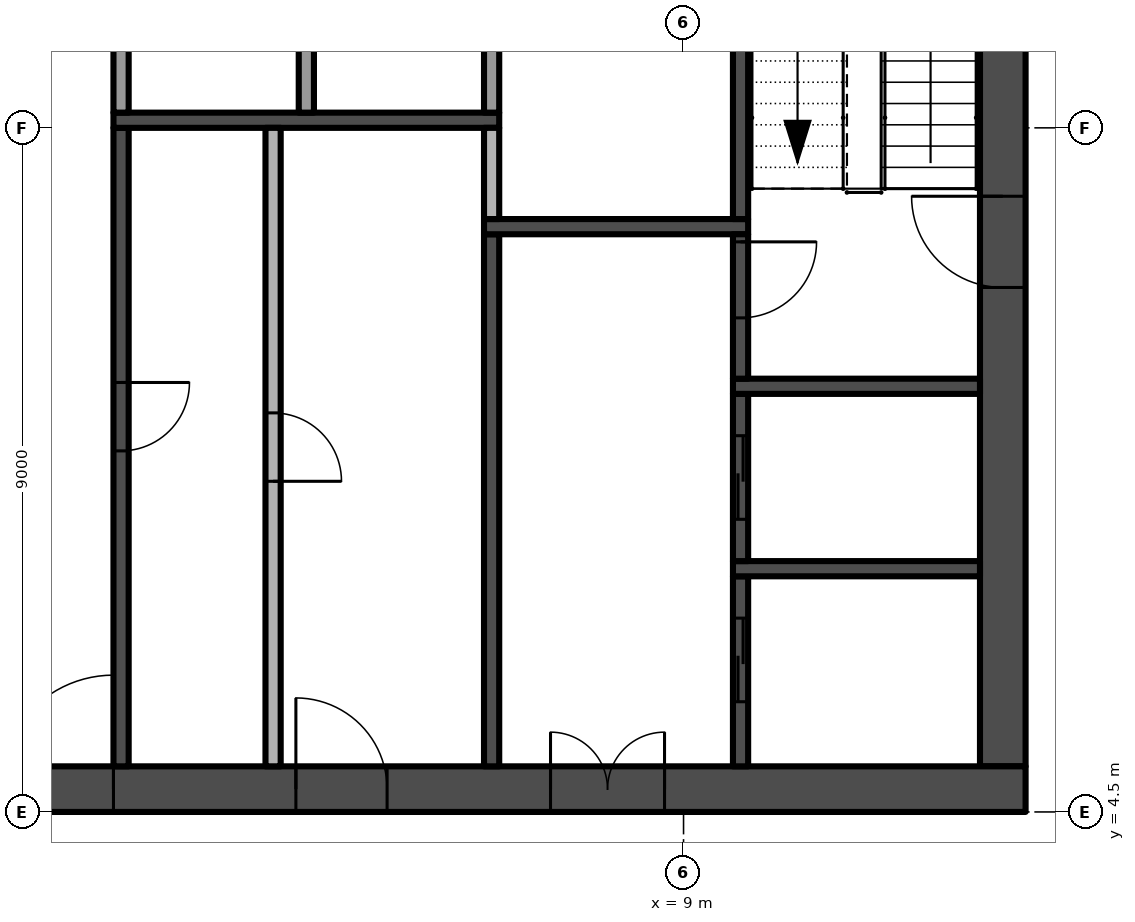
"""IFC4 building model, lengths in metres.
Left out: names, types, materials, properties, quantities, classifications, styles, units other than length and angle.
Written with IfcOpenShell. Run it as: python <this file> out.ifc"""

import sys

from ifc_helpers import new_model, si_unit, direction, frame, frame_2d, origin, place, context, subcontext, project, spatial, rectangle, extrude, element, fill, save


model = new_model("IFC4")
c1 = context("Model", 3, precision=1e-05, world=origin(), true_north=direction((0.0, 1.0)))
c2 = subcontext(c1, "Body", "Model", "MODEL_VIEW")
j1 = project(units=[si_unit("LENGTHUNIT", "METRE"), si_unit("PLANEANGLEUNIT", "RADIAN")], contexts=[c1])
p1 = place(None, origin())
s1 = spatial("IfcSite", under=j1, at=p1, CompositionType="ELEMENT")
p2 = place(p1, origin())
s2 = spatial("IfcBuilding", under=s1, at=p2, CompositionType="ELEMENT")
p3 = place(p2, frame((0.0, 0.0, 207.2)))
s3 = spatial("IfcBuildingStorey", under=s2, at=p3, CompositionType="ELEMENT", Elevation=207.2)
p4 = place(p3, frame((-13.5, 4.8, -0.3), z_axis=(0.0, 0.0, 1.0), x_axis=(1.0, 0.0, 0.0)))
e1 = element("IfcWall", 1, at=p4, inside=s3, PredefinedType="SHEAR", context=c2, shape_type="SweptSolid", body=[
    extrude(rectangle(XDim=27.0, YDim=0.6, at=frame_2d((13.5, 0.0))), origin(), (0.0, 0.0, 1.0), 3.8),
])
p5 = place(p4, frame((12.0, 0.0, 0.3)))
e2 = element("IfcOpeningElement", 2, at=p5, cuts=e1, PredefinedType="OPENING", context=c2, shape_type="SweptSolid", body=[
    extrude(rectangle(XDim=3.0, YDim=2.4, at=frame_2d((1.5, 1.2))), frame((0.0, 0.31, 0.0), z_axis=(0.0, -1.0, 0.0), x_axis=(1.0, 0.0, 0.0)), (0.0, 0.0, 1.0), 0.62),
])
p6 = place(p4, frame((4.9, 0.0, 0.3)))
e3 = element("IfcOpeningElement", 3, at=p6, cuts=e1, PredefinedType="OPENING", context=c2, shape_type="SweptSolid", body=[
    extrude(rectangle(XDim=1.2, YDim=2.2, at=frame_2d((0.6, 1.1))), frame((0.0, 0.31, 0.0), z_axis=(0.0, -1.0, 0.0), x_axis=(1.0, 0.0, 0.0)), (0.0, 0.0, 1.0), 0.62),
])
p7 = place(p4, frame((20.75, 0.0, 0.3)))
e4 = element("IfcOpeningElement", 4, at=p7, cuts=e1, PredefinedType="OPENING", context=c2, shape_type="SweptSolid", body=[
    extrude(rectangle(XDim=1.5, YDim=2.2, at=frame_2d((0.75, 1.1))), frame((0.0, 0.31, 0.0), z_axis=(0.0, -1.0, 0.0), x_axis=(1.0, 0.0, 0.0)), (0.0, 0.0, 1.0), 0.62),
])
p8 = place(p4, frame((17.4, 0.0, 0.3)))
e5 = element("IfcOpeningElement", 5, at=p8, cuts=e1, PredefinedType="OPENING", context=c2, shape_type="SweptSolid", body=[
    extrude(rectangle(XDim=1.2, YDim=2.2, at=frame_2d((0.6, 1.1))), frame((0.0, 0.31, 0.0), z_axis=(0.0, -1.0, 0.0), x_axis=(1.0, 0.0, 0.0)), (0.0, 0.0, 1.0), 0.62),
])
p9 = place(p3, frame((13.2, 5.1, -0.3), z_axis=(0.0, 0.0, 1.0), x_axis=(0.0, 1.0, 0.0)))
e6 = element("IfcWall", 6, at=p9, inside=s3, PredefinedType="SHEAR", context=c2, shape_type="SweptSolid", body=[
    extrude(rectangle(XDim=16.8, YDim=0.6, at=frame_2d((8.4, 0.0))), origin(), (0.0, 0.0, 1.0), 3.8),
])
p10 = place(p9, frame((6.3, 0.0, 0.3)))
e7 = element("IfcOpeningElement", 7, at=p10, cuts=e6, PredefinedType="OPENING", context=c2, shape_type="SweptSolid", body=[
    extrude(rectangle(XDim=1.2, YDim=2.2, at=frame_2d((0.6, 1.1))), frame((0.0, 0.31, 0.0), z_axis=(0.0, -1.0, 0.0), x_axis=(1.0, 0.0, 0.0)), (0.0, 0.0, 1.0), 0.62),
])
p11 = place(p3, frame((1.6, 13.5, 0.0), z_axis=(0.0, 0.0, 1.0), x_axis=(0.0, -1.0, 0.0)))
e8 = element("IfcWall", 8, at=p11, inside=s3, PredefinedType="SHEAR", context=c2, shape_type="SweptSolid", body=[
    extrude(rectangle(XDim=8.4, YDim=0.2, at=frame_2d((4.2, 0.0))), origin(), (0.0, 0.0, 1.0), 3.5),
])
p12 = place(p11, frame((3.35, 0.0, 0.0)))
e9 = element("IfcOpeningElement", 9, at=p12, cuts=e8, PredefinedType="OPENING", context=c2, shape_type="SweptSolid", body=[
    extrude(rectangle(XDim=0.9, YDim=2.1, at=frame_2d((0.45, 1.05))), frame((0.0, 0.11, 0.0), z_axis=(0.0, -1.0, 0.0), x_axis=(1.0, 0.0, 0.0)), (0.0, 0.0, 1.0), 0.22),
])
p13 = place(p3, frame((1.5, 13.6, 0.0), z_axis=(0.0, 0.0, 1.0), x_axis=(1.0, 0.0, 0.0)))
e10 = element("IfcWall", 10, at=p13, inside=s3, PredefinedType="SHEAR", context=c2, shape_type="SweptSolid", body=[
    extrude(rectangle(XDim=5.075, YDim=0.2, at=frame_2d((2.538, 0.0))), origin(), (0.0, 0.0, 1.0), 3.5),
])
p14 = place(p3, frame((1.6, 13.7, 0.0), z_axis=(0.0, 0.0, 1.0), x_axis=(0.0, 1.0, 0.0)))
e11 = element("IfcWall", 11, at=p14, inside=s3, PredefinedType="PARTITIONING", context=c2, shape_type="SweptSolid", body=[
    extrude(rectangle(XDim=2.2, YDim=0.2, at=frame_2d((1.1, 0.0))), origin(), (0.0, 0.0, 1.0), 3.5),
])
p15 = place(p3, frame((3.6, 13.5, 0.0), z_axis=(0.0, 0.0, 1.0), x_axis=(0.0, -1.0, 0.0)))
e12 = element("IfcWall", 12, at=p15, inside=s3, PredefinedType="PARTITIONING", context=c2, shape_type="SweptSolid", body=[
    extrude(rectangle(XDim=8.4, YDim=0.2, at=frame_2d((4.2, 0.0))), origin(), (0.0, 0.0, 1.0), 3.5),
])
p16 = place(p15, frame((3.75, 0.0, 0.0)))
e13 = element("IfcOpeningElement", 13, at=p16, cuts=e12, PredefinedType="OPENING", context=c2, shape_type="SweptSolid", body=[
    extrude(rectangle(XDim=0.9, YDim=2.1, at=frame_2d((0.45, 1.05))), frame((0.0, 0.11, 0.0), z_axis=(0.0, -1.0, 0.0), x_axis=(1.0, 0.0, 0.0)), (0.0, 0.0, 1.0), 0.22),
])
p17 = place(p3, frame((4.037, 13.7, 0.0), z_axis=(0.0, 0.0, 1.0), x_axis=(0.0, 1.0, 0.0)))
e14 = element("IfcWall", 14, at=p17, inside=s3, PredefinedType="PARTITIONING", context=c2, shape_type="SweptSolid", body=[
    extrude(rectangle(XDim=2.2, YDim=0.2, at=frame_2d((1.1, 0.0))), origin(), (0.0, 0.0, 1.0), 3.5),
])
p18 = place(p3, frame((6.475, 5.1, 0.0), z_axis=(0.0, 0.0, 1.0), x_axis=(0.0, 1.0, 0.0)))
e15 = element("IfcWall", 15, at=p18, inside=s3, PredefinedType="SHEAR", context=c2, shape_type="SweptSolid", body=[
    extrude(rectangle(XDim=7.0, YDim=0.2, at=frame_2d((3.5, 0.0))), origin(), (0.0, 0.0, 1.0), 3.5),
])
p19 = place(p3, frame((6.375, 12.2, 0.0), z_axis=(0.0, 0.0, 1.0), x_axis=(1.0, 0.0, 0.0)))
e16 = element("IfcWall", 16, at=p19, inside=s3, PredefinedType="SHEAR", context=c2, shape_type="SweptSolid", body=[
    extrude(rectangle(XDim=3.475, YDim=0.2, at=frame_2d((1.738, 0.0))), origin(), (0.0, 0.0, 1.0), 3.5),
])
p20 = place(p3, frame((6.475, 12.3, 0.0), z_axis=(0.0, 0.0, 1.0), x_axis=(0.0, 1.0, 0.0)))
e17 = element("IfcWall", 17, at=p20, inside=s3, PredefinedType="PARTITIONING", context=c2, shape_type="SweptSolid", body=[
    extrude(rectangle(XDim=1.2, YDim=0.2, at=frame_2d((0.6, 0.0))), origin(), (0.0, 0.0, 1.0), 3.5),
])
p21 = place(p3, frame((6.475, 13.7, 0.0), z_axis=(0.0, 0.0, 1.0), x_axis=(0.0, 1.0, 0.0)))
e18 = element("IfcWall", 18, at=p21, inside=s3, PredefinedType="PARTITIONING", context=c2, shape_type="SweptSolid", body=[
    extrude(rectangle(XDim=2.2, YDim=0.2, at=frame_2d((1.1, 0.0))), origin(), (0.0, 0.0, 1.0), 3.5),
])
p22 = place(p3, frame((9.75, 5.1, 0.0), z_axis=(0.0, 0.0, 1.0), x_axis=(0.0, 1.0, 0.0)))
e19 = element("IfcWall", 19, at=p22, inside=s3, PredefinedType="SHEAR", context=c2, shape_type="SweptSolid", body=[
    extrude(rectangle(XDim=2.5, YDim=0.2, at=frame_2d((1.25, 0.0))), origin(), (0.0, 0.0, 1.0), 3.5),
])
p23 = place(p22, frame((0.85, 0.0, 0.0)))
e20 = element("IfcOpeningElement", 20, at=p23, cuts=e19, PredefinedType="OPENING", context=c2, shape_type="SweptSolid", body=[
    extrude(rectangle(XDim=1.1, YDim=2.1, at=frame_2d((0.55, 1.05))), frame((0.0, 0.11, 0.0), z_axis=(0.0, -1.0, 0.0), x_axis=(1.0, 0.0, 0.0)), (0.0, 0.0, 1.0), 0.22),
])
p24 = place(p3, frame((9.65, 7.7, 0.0), z_axis=(0.0, 0.0, 1.0), x_axis=(1.0, 0.0, 0.0)))
e21 = element("IfcWall", 21, at=p24, inside=s3, PredefinedType="SHEAR", context=c2, shape_type="SweptSolid", body=[
    extrude(rectangle(XDim=3.25, YDim=0.2, at=frame_2d((1.625, 0.0))), origin(), (0.0, 0.0, 1.0), 3.5),
])
p25 = place(p3, frame((9.75, 7.8, 0.0), z_axis=(0.0, 0.0, 1.0), x_axis=(0.0, 1.0, 0.0)))
e22 = element("IfcWall", 22, at=p25, inside=s3, PredefinedType="SHEAR", context=c2, shape_type="SweptSolid", body=[
    extrude(rectangle(XDim=2.2, YDim=0.2, at=frame_2d((1.1, 0.0))), origin(), (0.0, 0.0, 1.0), 3.5),
])
p26 = place(p25, frame((0.55, 0.0, 0.0)))
e23 = element("IfcOpeningElement", 23, at=p26, cuts=e22, PredefinedType="OPENING", context=c2, shape_type="SweptSolid", body=[
    extrude(rectangle(XDim=1.1, YDim=2.1, at=frame_2d((0.55, 1.05))), frame((0.0, 0.11, 0.0), z_axis=(0.0, -1.0, 0.0), x_axis=(1.0, 0.0, 0.0)), (0.0, 0.0, 1.0), 0.22),
])
p27 = place(p3, frame((9.65, 10.1, 0.0), z_axis=(0.0, 0.0, 1.0), x_axis=(1.0, 0.0, 0.0)))
e24 = element("IfcWall", 24, at=p27, inside=s3, PredefinedType="SHEAR", context=c2, shape_type="SweptSolid", body=[
    extrude(rectangle(XDim=3.25, YDim=0.2, at=frame_2d((1.625, 0.0))), origin(), (0.0, 0.0, 1.0), 3.5),
])
p28 = place(p3, frame((9.75, 12.1, 0.0), z_axis=(0.0, 0.0, 1.0), x_axis=(0.0, -1.0, 0.0)))
e25 = element("IfcWall", 25, at=p28, inside=s3, PredefinedType="SHEAR", context=c2, shape_type="SweptSolid", body=[
    extrude(rectangle(XDim=1.9, YDim=0.2, at=frame_2d((0.95, 0.0))), origin(), (0.0, 0.0, 1.0), 3.5),
])
p29 = place(p28, frame((0.1, 0.0, 0.0)))
e26 = element("IfcOpeningElement", 26, at=p29, cuts=e25, PredefinedType="OPENING", context=c2, shape_type="SweptSolid", body=[
    extrude(rectangle(XDim=1.0, YDim=2.2, at=frame_2d((0.5, 1.1))), frame((0.0, 0.11, 0.0), z_axis=(0.0, -1.0, 0.0), x_axis=(1.0, 0.0, 0.0)), (0.0, 0.0, 1.0), 0.22),
])
p30 = place(p3, frame((9.75, 12.3, 0.0), z_axis=(0.0, 0.0, 1.0), x_axis=(0.0, 1.0, 0.0)))
e27 = element("IfcWall", 27, at=p30, inside=s3, PredefinedType="SHEAR", context=c2, shape_type="SweptSolid", body=[
    extrude(rectangle(XDim=3.6, YDim=0.2, at=frame_2d((1.8, 0.0))), origin(), (0.0, 0.0, 1.0), 3.5),
])
p31 = place(p5, frame((3.0, 0.0, 0.0), z_axis=(0.0, 0.0, 1.0), x_axis=(-1.0, 0.0, 0.0)))
e28 = element("IfcDoor", 28, at=p31, inside=s3, OperationType="DOUBLE_DOOR_SINGLE_SWING", PredefinedType="DOOR", context=c2, shape_type="SweptSolid", body=[
    extrude(rectangle(XDim=3.0, YDim=2.4, at=frame_2d((1.5, 1.2))), frame((0.0, 0.025, 0.0), z_axis=(0.0, -1.0, 0.0), x_axis=(1.0, 0.0, 0.0)), (0.0, 0.0, 1.0), 0.05),
])
fill(e2, e28)
p32 = place(p10, frame((1.2, 0.0, 0.0), z_axis=(0.0, 0.0, 1.0), x_axis=(-1.0, 0.0, 0.0)))
e29 = element("IfcDoor", 29, at=p32, inside=s3, OperationType="SINGLE_SWING_LEFT", PredefinedType="DOOR", context=c2, shape_type="SweptSolid", body=[
    extrude(rectangle(XDim=1.2, YDim=2.2, at=frame_2d((0.6, 1.1))), frame((0.0, 0.025, 0.0), z_axis=(0.0, -1.0, 0.0), x_axis=(1.0, 0.0, 0.0)), (0.0, 0.0, 1.0), 0.05),
])
fill(e7, e29)
p33 = place(p7, frame((1.5, 0.0, 0.0), z_axis=(0.0, 0.0, 1.0), x_axis=(-1.0, 0.0, 0.0)))
e30 = element("IfcDoor", 30, at=p33, inside=s3, OperationType="DOUBLE_DOOR_SINGLE_SWING", PredefinedType="DOOR", context=c2, shape_type="SweptSolid", body=[
    extrude(rectangle(XDim=1.5, YDim=2.2, at=frame_2d((0.75, 1.1))), frame((0.0, 0.025, 0.0), z_axis=(0.0, -1.0, 0.0), x_axis=(1.0, 0.0, 0.0)), (0.0, 0.0, 1.0), 0.05),
])
fill(e4, e30)
p34 = place(p8, frame((1.2, 0.0, 0.0), z_axis=(0.0, 0.0, 1.0), x_axis=(-1.0, 0.0, 0.0)))
e31 = element("IfcDoor", 31, at=p34, inside=s3, OperationType="SINGLE_SWING_RIGHT", PredefinedType="DOOR", context=c2, shape_type="SweptSolid", body=[
    extrude(rectangle(XDim=1.2, YDim=2.2, at=frame_2d((0.6, 1.1))), frame((0.0, 0.025, 0.0), z_axis=(0.0, -1.0, 0.0), x_axis=(1.0, 0.0, 0.0)), (0.0, 0.0, 1.0), 0.05),
])
fill(e5, e31)
p35 = place(p29, origin())
e32 = element("IfcDoor", 32, at=p35, inside=s3, OperationType="SINGLE_SWING_LEFT", PredefinedType="DOOR", context=c2, shape_type="SweptSolid", body=[
    extrude(rectangle(XDim=1.0, YDim=2.2, at=frame_2d((0.5, 1.1))), frame((0.0, 0.025, 0.0), z_axis=(0.0, -1.0, 0.0), x_axis=(1.0, 0.0, 0.0)), (0.0, 0.0, 1.0), 0.05),
])
fill(e26, e32)
p36 = place(p23, origin())
e33 = element("IfcDoor", 33, at=p36, inside=s3, OperationType="SLIDING_TO_RIGHT", PredefinedType="DOOR", context=c2, shape_type="SweptSolid", body=[
    extrude(rectangle(XDim=1.1, YDim=2.1, at=frame_2d((0.55, 1.05))), frame((0.0, 0.025, 0.0), z_axis=(0.0, -1.0, 0.0), x_axis=(1.0, 0.0, 0.0)), (0.0, 0.0, 1.0), 0.05),
])
fill(e20, e33)
p37 = place(p26, origin())
e34 = element("IfcDoor", 34, at=p37, inside=s3, OperationType="SLIDING_TO_RIGHT", PredefinedType="DOOR", context=c2, shape_type="SweptSolid", body=[
    extrude(rectangle(XDim=1.1, YDim=2.1, at=frame_2d((0.55, 1.05))), frame((0.0, 0.025, 0.0), z_axis=(0.0, -1.0, 0.0), x_axis=(1.0, 0.0, 0.0)), (0.0, 0.0, 1.0), 0.05),
])
fill(e23, e34)
p38 = place(p12, origin())
e35 = element("IfcDoor", 35, at=p38, inside=s3, OperationType="SINGLE_SWING_LEFT", PredefinedType="DOOR", context=c2, shape_type="SweptSolid", body=[
    extrude(rectangle(XDim=0.9, YDim=2.1, at=frame_2d((0.45, 1.05))), frame((0.0, 0.025, 0.0), z_axis=(0.0, -1.0, 0.0), x_axis=(1.0, 0.0, 0.0)), (0.0, 0.0, 1.0), 0.05),
])
fill(e9, e35)
p39 = place(p16, origin())
e36 = element("IfcDoor", 36, at=p39, inside=s3, OperationType="SINGLE_SWING_RIGHT", PredefinedType="DOOR", context=c2, shape_type="SweptSolid", body=[
    extrude(rectangle(XDim=0.9, YDim=2.1, at=frame_2d((0.45, 1.05))), frame((0.0, 0.025, 0.0), z_axis=(0.0, -1.0, 0.0), x_axis=(1.0, 0.0, 0.0)), (0.0, 0.0, 1.0), 0.05),
])
fill(e13, e36)
save(model, sys.argv[1])
